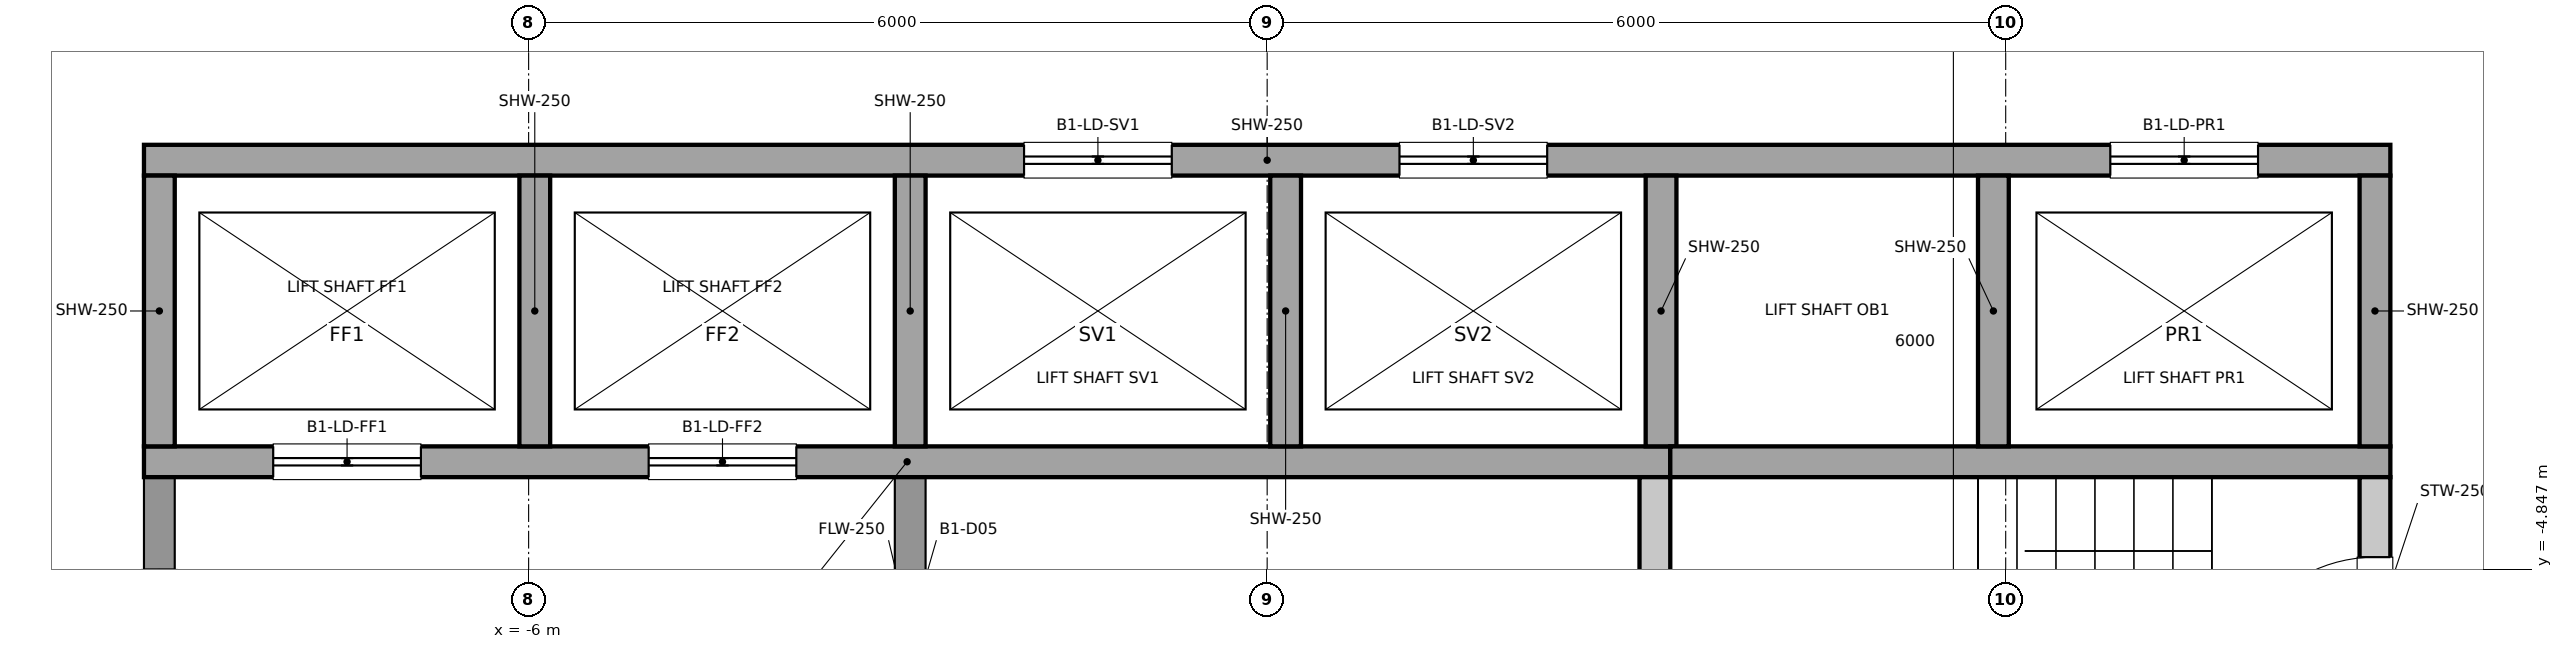
"""IFC4 building model, lengths in metres.
Left out: names, types, materials, properties, quantities, classifications, styles, units other than length and angle.
Written with IfcOpenShell. Run it as: python <this file> out.ifc"""

import sys

from ifc_helpers import new_model, si_unit, direction, frame, frame_2d, origin, place, context, subcontext, project, spatial, rectangle, extrude, element, fill, save


model = new_model("IFC4")
c1 = context("Model", 3, precision=1e-05, world=origin(), true_north=direction((0.0, 1.0)))
c2 = subcontext(c1, "Body", "Model", "MODEL_VIEW")
j1 = project(units=[si_unit("LENGTHUNIT", "METRE"), si_unit("PLANEANGLEUNIT", "RADIAN")], contexts=[c1])
p1 = place(None, origin())
s1 = spatial("IfcSite", under=j1, at=p1, CompositionType="ELEMENT")
p2 = place(p1, origin())
s2 = spatial("IfcBuilding", under=s1, at=p2, CompositionType="ELEMENT")
p3 = place(p2, frame((0.0, 0.0, -5.0)))
s3 = spatial("IfcBuildingStorey", under=s2, at=p3, CompositionType="ELEMENT", Elevation=-5.0)
p4 = place(p3, frame((9.0, -6.6, 0.0), z_axis=(0.0, 0.0, 1.0), x_axis=(0.0, 1.0, 0.0)))
e1 = element("IfcWall", 1, at=p4, inside=s3, PredefinedType="SOLIDWALL", context=c2, shape_type="SweptSolid", body=[
    extrude(rectangle(XDim=2.5, YDim=0.25, at=frame_2d((1.25, 0.0))), origin(), (0.0, 0.0, 1.0), 4.7),
])
p5 = place(p4, frame((0.65, 0.0, 0.0)))
e2 = element("IfcOpeningElement", 2, at=p5, cuts=e1, PredefinedType="OPENING", context=c2, shape_type="SweptSolid", body=[
    extrude(rectangle(XDim=1.2, YDim=2.1, at=frame_2d((0.6, 1.05))), frame((0.0, 0.125, 0.0), z_axis=(0.0, -1.0, 0.0), x_axis=(1.0, 0.0, 0.0)), (0.0, 0.0, 1.0), 0.25),
])
p6 = place(p3, frame((-9.0, -6.6, 0.0), z_axis=(0.0, 0.0, 1.0), x_axis=(0.0, 1.0, 0.0)))
e3 = element("IfcWall", 3, at=p6, inside=s3, PredefinedType="PARTITIONING", context=c2, shape_type="SweptSolid", body=[
    extrude(rectangle(XDim=2.5, YDim=0.25, at=frame_2d((1.25, 0.0))), origin(), (0.0, 0.0, 1.0), 4.7),
])
p7 = place(p6, frame((0.75, 0.0, 0.0)))
e4 = element("IfcOpeningElement", 4, at=p7, cuts=e3, PredefinedType="OPENING", context=c2, shape_type="SweptSolid", body=[
    extrude(rectangle(XDim=1.0, YDim=2.1, at=frame_2d((0.5, 1.05))), frame((0.0, 0.125, 0.0), z_axis=(0.0, -1.0, 0.0), x_axis=(1.0, 0.0, 0.0)), (0.0, 0.0, 1.0), 0.25),
])
p8 = place(p3, frame((3.15, -6.6, 0.0), z_axis=(0.0, 0.0, 1.0), x_axis=(0.0, 1.0, 0.0)))
e5 = element("IfcWall", 5, at=p8, inside=s3, PredefinedType="SOLIDWALL", context=c2, shape_type="SweptSolid", body=[
    extrude(rectangle(XDim=2.5, YDim=0.25, at=frame_2d((1.25, 0.0))), origin(), (0.0, 0.0, 1.0), 4.7),
])
p9 = place(p3, frame((-2.9, -6.6, 0.0), z_axis=(0.0, 0.0, 1.0), x_axis=(0.0, 1.0, 0.0)))
e6 = element("IfcWall", 6, at=p9, inside=s3, PredefinedType="PARTITIONING", context=c2, shape_type="SweptSolid", body=[
    extrude(rectangle(XDim=2.5, YDim=0.25, at=frame_2d((1.25, 0.0))), origin(), (0.0, 0.0, 1.0), 4.7),
])
p10 = place(p9, frame((0.8, 0.0, 0.0)))
e7 = element("IfcOpeningElement", 7, at=p10, cuts=e6, PredefinedType="OPENING", context=c2, shape_type="SweptSolid", body=[
    extrude(rectangle(XDim=0.9, YDim=2.1, at=frame_2d((0.45, 1.05))), frame((0.0, 0.125, 0.0), z_axis=(0.0, -1.0, 0.0), x_axis=(1.0, 0.0, 0.0)), (0.0, 0.0, 1.0), 0.25),
])
p11 = place(p3, frame((-9.125, -1.525, 0.0), z_axis=(0.0, 0.0, 1.0), x_axis=(1.0, 0.0, 0.0)))
e8 = element("IfcWall", 8, at=p11, inside=s3, PredefinedType="SOLIDWALL", context=c2, shape_type="SweptSolid", body=[
    extrude(rectangle(XDim=18.25, YDim=0.25, at=frame_2d((9.125, 0.0))), origin(), (0.0, 0.0, 1.0), 4.7),
])
p12 = place(p11, frame((7.15, 0.0, 0.0)))
e9 = element("IfcOpeningElement", 9, at=p12, cuts=e8, PredefinedType="OPENING", context=c2, shape_type="SweptSolid", body=[
    extrude(rectangle(XDim=1.2, YDim=2.1, at=frame_2d((0.6, 1.05))), frame((0.0, 0.125, 0.0), z_axis=(0.0, -1.0, 0.0), x_axis=(1.0, 0.0, 0.0)), (0.0, 0.0, 1.0), 0.25),
])
p13 = place(p11, frame((10.2, 0.0, 0.0)))
e10 = element("IfcOpeningElement", 10, at=p13, cuts=e8, PredefinedType="OPENING", context=c2, shape_type="SweptSolid", body=[
    extrude(rectangle(XDim=1.2, YDim=2.1, at=frame_2d((0.6, 1.05))), frame((0.0, 0.125, 0.0), z_axis=(0.0, -1.0, 0.0), x_axis=(1.0, 0.0, 0.0)), (0.0, 0.0, 1.0), 0.25),
])
p14 = place(p11, frame((15.975, 0.0, 0.0)))
e11 = element("IfcOpeningElement", 11, at=p14, cuts=e8, PredefinedType="OPENING", context=c2, shape_type="SweptSolid", body=[
    extrude(rectangle(XDim=1.2, YDim=2.1, at=frame_2d((0.6, 1.05))), frame((0.0, 0.125, 0.0), z_axis=(0.0, -1.0, 0.0), x_axis=(1.0, 0.0, 0.0)), (0.0, 0.0, 1.0), 0.25),
])
p15 = place(p3, frame((-9.125, -3.975, 0.0), z_axis=(0.0, 0.0, 1.0), x_axis=(1.0, 0.0, 0.0)))
e12 = element("IfcWall", 12, at=p15, inside=s3, PredefinedType="SOLIDWALL", context=c2, shape_type="SweptSolid", body=[
    extrude(rectangle(XDim=12.4, YDim=0.25, at=frame_2d((6.2, 0.0))), origin(), (0.0, 0.0, 1.0), 4.7),
])
p16 = place(p15, frame((1.05, 0.0, 0.0)))
e13 = element("IfcOpeningElement", 13, at=p16, cuts=e12, PredefinedType="OPENING", context=c2, shape_type="SweptSolid", body=[
    extrude(rectangle(XDim=1.2, YDim=2.1, at=frame_2d((0.6, 1.05))), frame((0.0, 0.125, 0.0), z_axis=(0.0, -1.0, 0.0), x_axis=(1.0, 0.0, 0.0)), (0.0, 0.0, 1.0), 0.25),
])
p17 = place(p15, frame((4.1, 0.0, 0.0)))
e14 = element("IfcOpeningElement", 14, at=p17, cuts=e12, PredefinedType="OPENING", context=c2, shape_type="SweptSolid", body=[
    extrude(rectangle(XDim=1.2, YDim=2.1, at=frame_2d((0.6, 1.05))), frame((0.0, 0.125, 0.0), z_axis=(0.0, -1.0, 0.0), x_axis=(1.0, 0.0, 0.0)), (0.0, 0.0, 1.0), 0.25),
])
p18 = place(p3, frame((3.275, -3.975, 0.0), z_axis=(0.0, 0.0, 1.0), x_axis=(1.0, 0.0, 0.0)))
e15 = element("IfcWall", 15, at=p18, inside=s3, PredefinedType="SOLIDWALL", context=c2, shape_type="SweptSolid", body=[
    extrude(rectangle(XDim=5.85, YDim=0.25, at=frame_2d((2.925, 0.0))), origin(), (0.0, 0.0, 1.0), 4.7),
])
for number, where, z_axis, x_axis in (
    (16, (-9.0, -3.85, 0.0), (0.0, 0.0, 1.0), (0.0, 1.0, 0.0)),
    (17, (-5.95, -3.85, 0.0), (0.0, 0.0, 1.0), (0.0, 1.0, 0.0)),
    (18, (-2.9, -3.85, 0.0), (0.0, 0.0, 1.0), (0.0, 1.0, 0.0)),
    (19, (0.15, -3.85, 0.0), (0.0, 0.0, 1.0), (0.0, 1.0, 0.0)),
    (20, (3.2, -3.85, 0.0), (0.0, 0.0, 1.0), (0.0, 1.0, 0.0)),
    (21, (5.9, -3.85, 0.0), (0.0, 0.0, 1.0), (0.0, 1.0, 0.0)),
    (22, (9.0, -3.85, 0.0), (0.0, 0.0, 1.0), (0.0, 1.0, 0.0)),
):
    element("IfcWall", number, at=place(p3, frame(where, z_axis=z_axis, x_axis=x_axis)), inside=s3, PredefinedType="SOLIDWALL", context=c2, shape_type="SweptSolid", body=[
        extrude(rectangle(XDim=2.2, YDim=0.25, at=frame_2d((1.1, 0.0))), origin(), (0.0, 0.0, 1.0), 4.7),
    ])
p19 = place(p16, origin())
e23 = element("IfcDoor", 23, at=p19, inside=s3, OperationType="DOUBLE_DOOR_SLIDING", PredefinedType="DOOR", context=c2, shape_type="SweptSolid", body=[
    extrude(rectangle(XDim=1.2, YDim=2.1, at=frame_2d((0.6, 1.05))), frame((0.0, 0.025, 0.0), z_axis=(0.0, -1.0, 0.0), x_axis=(1.0, 0.0, 0.0)), (0.0, 0.0, 1.0), 0.05),
])
fill(e13, e23)
p20 = place(p17, origin())
e24 = element("IfcDoor", 24, at=p20, inside=s3, OperationType="DOUBLE_DOOR_SLIDING", PredefinedType="DOOR", context=c2, shape_type="SweptSolid", body=[
    extrude(rectangle(XDim=1.2, YDim=2.1, at=frame_2d((0.6, 1.05))), frame((0.0, 0.025, 0.0), z_axis=(0.0, -1.0, 0.0), x_axis=(1.0, 0.0, 0.0)), (0.0, 0.0, 1.0), 0.05),
])
fill(e14, e24)
p21 = place(p12, origin())
e25 = element("IfcDoor", 25, at=p21, inside=s3, OperationType="DOUBLE_DOOR_SLIDING", PredefinedType="DOOR", context=c2, shape_type="SweptSolid", body=[
    extrude(rectangle(XDim=1.2, YDim=2.1, at=frame_2d((0.6, 1.05))), frame((0.0, 0.025, 0.0), z_axis=(0.0, -1.0, 0.0), x_axis=(1.0, 0.0, 0.0)), (0.0, 0.0, 1.0), 0.05),
])
fill(e9, e25)
p22 = place(p13, origin())
e26 = element("IfcDoor", 26, at=p22, inside=s3, OperationType="DOUBLE_DOOR_SLIDING", PredefinedType="DOOR", context=c2, shape_type="SweptSolid", body=[
    extrude(rectangle(XDim=1.2, YDim=2.1, at=frame_2d((0.6, 1.05))), frame((0.0, 0.025, 0.0), z_axis=(0.0, -1.0, 0.0), x_axis=(1.0, 0.0, 0.0)), (0.0, 0.0, 1.0), 0.05),
])
fill(e10, e26)
p23 = place(p14, origin())
e27 = element("IfcDoor", 27, at=p23, inside=s3, OperationType="DOUBLE_DOOR_SLIDING", PredefinedType="DOOR", context=c2, shape_type="SweptSolid", body=[
    extrude(rectangle(XDim=1.2, YDim=2.1, at=frame_2d((0.6, 1.05))), frame((0.0, 0.025, 0.0), z_axis=(0.0, -1.0, 0.0), x_axis=(1.0, 0.0, 0.0)), (0.0, 0.0, 1.0), 0.05),
])
fill(e11, e27)
p24 = place(p5, origin())
e28 = element("IfcDoor", 28, at=p24, inside=s3, OperationType="SINGLE_SWING_LEFT", PredefinedType="DOOR", context=c2, shape_type="SweptSolid", body=[
    extrude(rectangle(XDim=1.2, YDim=2.1, at=frame_2d((0.6, 1.05))), frame((0.0, 0.025, 0.0), z_axis=(0.0, -1.0, 0.0), x_axis=(1.0, 0.0, 0.0)), (0.0, 0.0, 1.0), 0.05),
])
fill(e2, e28)
save(model, sys.argv[1])
